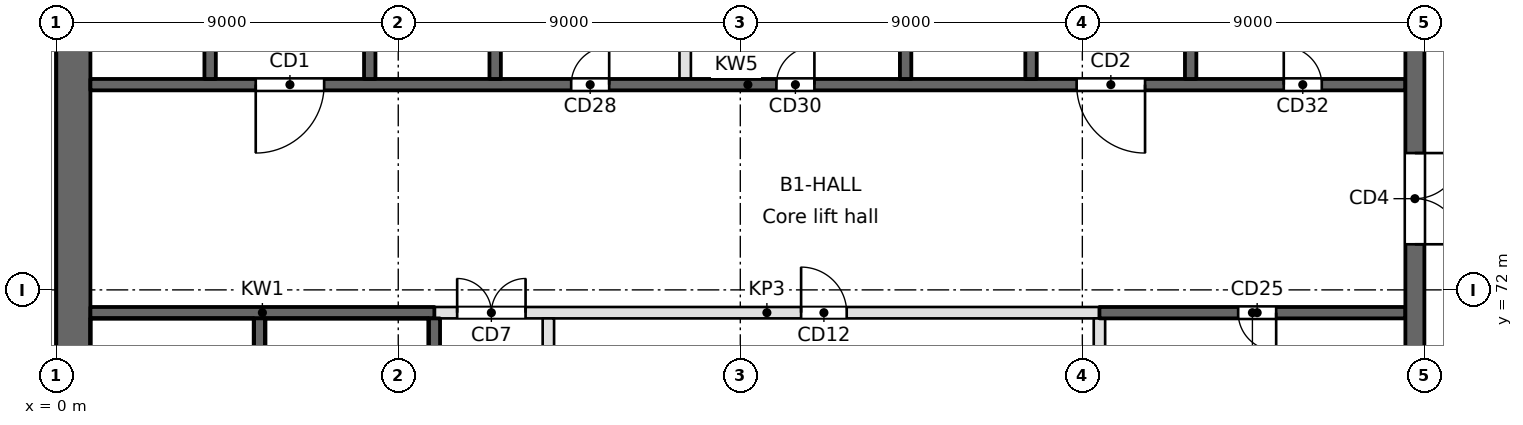
"""IFC4 building model, lengths in metres.
Left out: names, types, materials, properties, quantities, classifications, styles, units other than length and angle.
Written with IfcOpenShell. Run it as: python <this file> out.ifc"""

import sys

from ifc_helpers import new_model, si_unit, direction, frame, frame_2d, origin, place, context, subcontext, project, spatial, rectangle, extrude, element, fill, save


model = new_model("IFC4")
c1 = context("Model", 3, precision=1e-05, world=origin(), true_north=direction((0.0, 1.0)))
c2 = subcontext(c1, "Body", "Model", "MODEL_VIEW")
j1 = project(units=[si_unit("LENGTHUNIT", "METRE"), si_unit("PLANEANGLEUNIT", "RADIAN")], contexts=[c1])
p1 = place(None, origin())
s1 = spatial("IfcSite", under=j1, at=p1, CompositionType="ELEMENT")
p2 = place(p1, origin())
s2 = spatial("IfcBuilding", under=s1, at=p2, CompositionType="ELEMENT")
p3 = place(p2, frame((0.0, 0.0, -6.0)))
s3 = spatial("IfcBuildingStorey", under=s2, at=p3, CompositionType="ELEMENT", Elevation=-6.0)
p4 = place(p3, frame((0.45, 94.5, 0.0), z_axis=(0.0, 0.0, 1.0), x_axis=(0.0, -1.0, 0.0)))
e1 = element("IfcWall", 1, at=p4, inside=s3, PredefinedType="SHEAR", context=c2, shape_type="SweptSolid", body=[
    extrude(rectangle(XDim=66.085, YDim=0.9, at=frame_2d((33.042, 0.0))), origin(), (0.0, 0.0, 1.0), 6.0),
])
p5 = place(p3, frame((0.9, 71.4, 0.0), z_axis=(0.0, 0.0, 1.0), x_axis=(1.0, 0.0, 0.0)))
e2 = element("IfcWall", 2, at=p5, inside=s3, PredefinedType="SOLIDWALL", context=c2, shape_type="SweptSolid", body=[
    extrude(rectangle(XDim=9.05, YDim=0.3, at=frame_2d((4.525, 0.0))), origin(), (0.0, 0.0, 1.0), 5.6),
])
p6 = place(p3, frame((9.95, 71.4, 0.0), z_axis=(0.0, 0.0, 1.0), x_axis=(1.0, 0.0, 0.0)))
e3 = element("IfcWall", 3, at=p6, inside=s3, PredefinedType="PARTITIONING", context=c2, shape_type="SweptSolid", body=[
    extrude(rectangle(XDim=17.5, YDim=0.3, at=frame_2d((8.75, 0.0))), origin(), (0.0, 0.0, 1.0), 5.6),
])
p7 = place(p6, frame((0.6, 0.0, 0.0)))
e4 = element("IfcOpeningElement", 4, at=p7, cuts=e3, PredefinedType="OPENING", context=c2, shape_type="SweptSolid", body=[
    extrude(rectangle(XDim=1.8, YDim=2.1, at=frame_2d((0.9, 1.05))), frame((0.0, 0.15, 0.0), z_axis=(0.0, -1.0, 0.0), x_axis=(1.0, 0.0, 0.0)), (0.0, 0.0, 1.0), 0.3),
])
p8 = place(p6, frame((9.65, 0.0, 0.0)))
e5 = element("IfcOpeningElement", 5, at=p8, cuts=e3, PredefinedType="OPENING", context=c2, shape_type="SweptSolid", body=[
    extrude(rectangle(XDim=1.2, YDim=2.1, at=frame_2d((0.6, 1.05))), frame((0.0, 0.15, 0.0), z_axis=(0.0, -1.0, 0.0), x_axis=(1.0, 0.0, 0.0)), (0.0, 0.0, 1.0), 0.3),
])
p9 = place(p3, frame((27.45, 71.4, 0.0), z_axis=(0.0, 0.0, 1.0), x_axis=(1.0, 0.0, 0.0)))
e6 = element("IfcWall", 6, at=p9, inside=s3, PredefinedType="SOLIDWALL", context=c2, shape_type="SweptSolid", body=[
    extrude(rectangle(XDim=8.05, YDim=0.3, at=frame_2d((4.025, 0.0))), origin(), (0.0, 0.0, 1.0), 5.6),
])
p10 = place(p9, frame((3.65, 0.0, 0.0)))
e7 = element("IfcOpeningElement", 7, at=p10, cuts=e6, PredefinedType="OPENING", context=c2, shape_type="SweptSolid", body=[
    extrude(rectangle(XDim=1.0, YDim=2.1, at=frame_2d((0.5, 1.05))), frame((0.0, 0.15, 0.0), z_axis=(0.0, -1.0, 0.0), x_axis=(1.0, 0.0, 0.0)), (0.0, 0.0, 1.0), 0.3),
])
p11 = place(p3, frame((0.9, 77.4, 0.0), z_axis=(0.0, 0.0, 1.0), x_axis=(1.0, 0.0, 0.0)))
e8 = element("IfcWall", 8, at=p11, inside=s3, PredefinedType="SOLIDWALL", context=c2, shape_type="SweptSolid", body=[
    extrude(rectangle(XDim=34.6, YDim=0.3, at=frame_2d((17.3, 0.0))), origin(), (0.0, 0.0, 1.0), 5.6),
])
p12 = place(p11, frame((4.35, 0.0, 0.0)))
e9 = element("IfcOpeningElement", 9, at=p12, cuts=e8, PredefinedType="OPENING", context=c2, shape_type="SweptSolid", body=[
    extrude(rectangle(XDim=1.8, YDim=2.1, at=frame_2d((0.9, 1.05))), frame((0.0, 0.15, 0.0), z_axis=(0.0, -1.0, 0.0), x_axis=(1.0, 0.0, 0.0)), (0.0, 0.0, 1.0), 0.3),
])
p13 = place(p11, frame((25.95, 0.0, 0.0)))
e10 = element("IfcOpeningElement", 10, at=p13, cuts=e8, PredefinedType="OPENING", context=c2, shape_type="SweptSolid", body=[
    extrude(rectangle(XDim=1.8, YDim=2.1, at=frame_2d((0.9, 1.05))), frame((0.0, 0.15, 0.0), z_axis=(0.0, -1.0, 0.0), x_axis=(1.0, 0.0, 0.0)), (0.0, 0.0, 1.0), 0.3),
])
p14 = place(p11, frame((12.65, 0.0, 0.0)))
e11 = element("IfcOpeningElement", 11, at=p14, cuts=e8, PredefinedType="OPENING", context=c2, shape_type="SweptSolid", body=[
    extrude(rectangle(XDim=1.0, YDim=2.1, at=frame_2d((0.5, 1.05))), frame((0.0, 0.15, 0.0), z_axis=(0.0, -1.0, 0.0), x_axis=(1.0, 0.0, 0.0)), (0.0, 0.0, 1.0), 0.3),
])
p15 = place(p11, frame((18.05, 0.0, 0.0)))
e12 = element("IfcOpeningElement", 12, at=p15, cuts=e8, PredefinedType="OPENING", context=c2, shape_type="SweptSolid", body=[
    extrude(rectangle(XDim=1.0, YDim=2.1, at=frame_2d((0.5, 1.05))), frame((0.0, 0.15, 0.0), z_axis=(0.0, -1.0, 0.0), x_axis=(1.0, 0.0, 0.0)), (0.0, 0.0, 1.0), 0.3),
])
p16 = place(p11, frame((31.4, 0.0, 0.0)))
e13 = element("IfcOpeningElement", 13, at=p16, cuts=e8, PredefinedType="OPENING", context=c2, shape_type="SweptSolid", body=[
    extrude(rectangle(XDim=1.0, YDim=2.1, at=frame_2d((0.5, 1.05))), frame((0.0, 0.15, 0.0), z_axis=(0.0, -1.0, 0.0), x_axis=(1.0, 0.0, 0.0)), (0.0, 0.0, 1.0), 0.3),
])
p17 = place(p3, frame((4.05, 77.55, 0.0), z_axis=(0.0, 0.0, 1.0), x_axis=(0.0, 1.0, 0.0)))
e14 = element("IfcWall", 14, at=p17, inside=s3, PredefinedType="SOLIDWALL", context=c2, shape_type="SweptSolid", body=[
    extrude(rectangle(XDim=10.1, YDim=0.3, at=frame_2d((5.05, 0.0))), origin(), (0.0, 0.0, 1.0), 5.6),
])
p18 = place(p3, frame((5.35, 63.5, 0.0), z_axis=(0.0, 0.0, 1.0), x_axis=(0.0, 1.0, 0.0)))
e15 = element("IfcWall", 15, at=p18, inside=s3, PredefinedType="SOLIDWALL", context=c2, shape_type="SweptSolid", body=[
    extrude(rectangle(XDim=7.75, YDim=0.3, at=frame_2d((3.875, 0.0))), origin(), (0.0, 0.0, 1.0), 5.6),
])
p19 = place(p3, frame((8.25, 77.55, 0.0), z_axis=(0.0, 0.0, 1.0), x_axis=(0.0, 1.0, 0.0)))
e16 = element("IfcWall", 16, at=p19, inside=s3, PredefinedType="SOLIDWALL", context=c2, shape_type="SweptSolid", body=[
    extrude(rectangle(XDim=10.1, YDim=0.3, at=frame_2d((5.05, 0.0))), origin(), (0.0, 0.0, 1.0), 5.6),
])
p20 = place(p3, frame((9.95, 63.5, 0.0), z_axis=(0.0, 0.0, 1.0), x_axis=(0.0, 1.0, 0.0)))
e17 = element("IfcWall", 17, at=p20, inside=s3, PredefinedType="SOLIDWALL", context=c2, shape_type="SweptSolid", body=[
    extrude(rectangle(XDim=7.75, YDim=0.3, at=frame_2d((3.875, 0.0))), origin(), (0.0, 0.0, 1.0), 5.6),
])
p21 = place(p3, frame((11.55, 77.55, 0.0), z_axis=(0.0, 0.0, 1.0), x_axis=(0.0, 1.0, 0.0)))
e18 = element("IfcWall", 18, at=p21, inside=s3, PredefinedType="SOLIDWALL", context=c2, shape_type="SweptSolid", body=[
    extrude(rectangle(XDim=10.1, YDim=0.3, at=frame_2d((5.05, 0.0))), origin(), (0.0, 0.0, 1.0), 5.6),
])
p22 = place(p3, frame((12.95, 63.5, 0.0), z_axis=(0.0, 0.0, 1.0), x_axis=(0.0, 1.0, 0.0)))
e19 = element("IfcWall", 19, at=p22, inside=s3, PredefinedType="PARTITIONING", context=c2, shape_type="SweptSolid", body=[
    extrude(rectangle(XDim=7.75, YDim=0.3, at=frame_2d((3.875, 0.0))), origin(), (0.0, 0.0, 1.0), 5.6),
])
p23 = place(p3, frame((16.55, 77.55, 0.0), z_axis=(0.0, 0.0, 1.0), x_axis=(0.0, 1.0, 0.0)))
e20 = element("IfcWall", 20, at=p23, inside=s3, PredefinedType="PARTITIONING", context=c2, shape_type="SweptSolid", body=[
    extrude(rectangle(XDim=12.95, YDim=0.3, at=frame_2d((6.475, 0.0))), origin(), (0.0, 0.0, 1.0), 5.6),
])
for number, where, z_axis, x_axis in (
    (21, (22.35, 77.55, 0.0), (0.0, 0.0, 1.0), (0.0, 1.0, 0.0)),
    (22, (25.65, 77.55, 0.0), (0.0, 0.0, 1.0), (0.0, 1.0, 0.0)),
):
    element("IfcWall", number, at=place(p3, frame(where, z_axis=z_axis, x_axis=x_axis)), inside=s3, PredefinedType="SOLIDWALL", context=c2, shape_type="SweptSolid", body=[
        extrude(rectangle(XDim=10.1, YDim=0.3, at=frame_2d((5.05, 0.0))), origin(), (0.0, 0.0, 1.0), 5.6),
    ])
p24 = place(p3, frame((27.45, 68.05, 0.0), z_axis=(0.0, 0.0, 1.0), x_axis=(0.0, 1.0, 0.0)))
e23 = element("IfcWall", 23, at=p24, inside=s3, PredefinedType="PARTITIONING", context=c2, shape_type="SweptSolid", body=[
    extrude(rectangle(XDim=3.2, YDim=0.3, at=frame_2d((1.6, 0.0))), origin(), (0.0, 0.0, 1.0), 5.6),
])
p25 = place(p3, frame((29.85, 77.55, 0.0), z_axis=(0.0, 0.0, 1.0), x_axis=(0.0, 1.0, 0.0)))
e24 = element("IfcWall", 24, at=p25, inside=s3, PredefinedType="SOLIDWALL", context=c2, shape_type="SweptSolid", body=[
    extrude(rectangle(XDim=10.1, YDim=0.3, at=frame_2d((5.05, 0.0))), origin(), (0.0, 0.0, 1.0), 5.6),
])
p26 = place(p3, frame((35.75, 63.5, 0.0), z_axis=(0.0, 0.0, 1.0), x_axis=(0.0, 1.0, 0.0)))
e25 = element("IfcWall", 25, at=p26, inside=s3, PredefinedType="SOLIDWALL", context=c2, shape_type="SweptSolid", body=[
    extrude(rectangle(XDim=34.6, YDim=0.5, at=frame_2d((17.3, 0.0))), origin(), (0.0, 0.0, 1.0), 5.6),
])
p27 = place(p26, frame((9.7, 0.0, 0.0)))
e26 = element("IfcOpeningElement", 26, at=p27, cuts=e25, PredefinedType="OPENING", context=c2, shape_type="SweptSolid", body=[
    extrude(rectangle(XDim=2.4, YDim=2.1, at=frame_2d((1.2, 1.05))), frame((0.0, 0.25, 0.0), z_axis=(0.0, -1.0, 0.0), x_axis=(1.0, 0.0, 0.0)), (0.0, 0.0, 1.0), 0.5),
])
p28 = place(p26, frame((27.9, 0.0, 0.0)))
e27 = element("IfcOpeningElement", 27, at=p28, cuts=e25, PredefinedType="OPENING", context=c2, shape_type="SweptSolid", body=[
    extrude(rectangle(XDim=1.5, YDim=2.1, at=frame_2d((0.75, 1.05))), frame((0.0, 0.25, 0.0), z_axis=(0.0, -1.0, 0.0), x_axis=(1.0, 0.0, 0.0)), (0.0, 0.0, 1.0), 0.5),
])
p29 = place(p26, frame((1.5, 0.0, 0.0)))
e28 = element("IfcOpeningElement", 28, at=p29, cuts=e25, PredefinedType="OPENING", context=c2, shape_type="SweptSolid", body=[
    extrude(rectangle(XDim=1.2, YDim=2.1, at=frame_2d((0.6, 1.05))), frame((0.0, 0.25, 0.0), z_axis=(0.0, -1.0, 0.0), x_axis=(1.0, 0.0, 0.0)), (0.0, 0.0, 1.0), 0.5),
])
p30 = place(p12, frame((1.8, 0.0, 0.0), z_axis=(0.0, 0.0, 1.0), x_axis=(-1.0, 0.0, 0.0)))
e29 = element("IfcDoor", 29, at=p30, inside=s3, OperationType="SINGLE_SWING_RIGHT", PredefinedType="DOOR", context=c2, shape_type="SweptSolid", body=[
    extrude(rectangle(XDim=1.8, YDim=2.1, at=frame_2d((0.9, 1.05))), frame((0.0, 0.025, 0.0), z_axis=(0.0, -1.0, 0.0), x_axis=(1.0, 0.0, 0.0)), (0.0, 0.0, 1.0), 0.05),
])
fill(e9, e29)
p31 = place(p13, frame((1.8, 0.0, 0.0), z_axis=(0.0, 0.0, 1.0), x_axis=(-1.0, 0.0, 0.0)))
e30 = element("IfcDoor", 30, at=p31, inside=s3, OperationType="SINGLE_SWING_LEFT", PredefinedType="DOOR", context=c2, shape_type="SweptSolid", body=[
    extrude(rectangle(XDim=1.8, YDim=2.1, at=frame_2d((0.9, 1.05))), frame((0.0, 0.025, 0.0), z_axis=(0.0, -1.0, 0.0), x_axis=(1.0, 0.0, 0.0)), (0.0, 0.0, 1.0), 0.05),
])
fill(e10, e30)
p32 = place(p27, frame((2.4, 0.0, 0.0), z_axis=(0.0, 0.0, 1.0), x_axis=(-1.0, 0.0, 0.0)))
e31 = element("IfcDoor", 31, at=p32, inside=s3, OperationType="DOUBLE_DOOR_SINGLE_SWING", PredefinedType="DOOR", context=c2, shape_type="SweptSolid", body=[
    extrude(rectangle(XDim=2.4, YDim=2.1, at=frame_2d((1.2, 1.05))), frame((0.0, 0.025, 0.0), z_axis=(0.0, -1.0, 0.0), x_axis=(1.0, 0.0, 0.0)), (0.0, 0.0, 1.0), 0.05),
])
fill(e26, e31)
p33 = place(p7, origin())
e32 = element("IfcDoor", 32, at=p33, inside=s3, OperationType="DOUBLE_DOOR_SINGLE_SWING", PredefinedType="DOOR", context=c2, shape_type="SweptSolid", body=[
    extrude(rectangle(XDim=1.8, YDim=2.1, at=frame_2d((0.9, 1.05))), frame((0.0, 0.025, 0.0), z_axis=(0.0, -1.0, 0.0), x_axis=(1.0, 0.0, 0.0)), (0.0, 0.0, 1.0), 0.05),
])
fill(e4, e32)
p34 = place(p8, origin())
e33 = element("IfcDoor", 33, at=p34, inside=s3, OperationType="SINGLE_SWING_LEFT", PredefinedType="DOOR", context=c2, shape_type="SweptSolid", body=[
    extrude(rectangle(XDim=1.2, YDim=2.1, at=frame_2d((0.6, 1.05))), frame((0.0, 0.025, 0.0), z_axis=(0.0, -1.0, 0.0), x_axis=(1.0, 0.0, 0.0)), (0.0, 0.0, 1.0), 0.05),
])
fill(e5, e33)
p35 = place(p10, frame((1.0, 0.0, 0.0), z_axis=(0.0, 0.0, 1.0), x_axis=(-1.0, 0.0, 0.0)))
e34 = element("IfcDoor", 34, at=p35, inside=s3, OperationType="SINGLE_SWING_LEFT", PredefinedType="DOOR", context=c2, shape_type="SweptSolid", body=[
    extrude(rectangle(XDim=1.0, YDim=2.1, at=frame_2d((0.5, 1.05))), frame((0.0, 0.025, 0.0), z_axis=(0.0, -1.0, 0.0), x_axis=(1.0, 0.0, 0.0)), (0.0, 0.0, 1.0), 0.05),
])
fill(e7, e34)
p36 = place(p14, origin())
e35 = element("IfcDoor", 35, at=p36, inside=s3, OperationType="SINGLE_SWING_RIGHT", PredefinedType="DOOR", context=c2, shape_type="SweptSolid", body=[
    extrude(rectangle(XDim=1.0, YDim=2.1, at=frame_2d((0.5, 1.05))), frame((0.0, 0.025, 0.0), z_axis=(0.0, -1.0, 0.0), x_axis=(1.0, 0.0, 0.0)), (0.0, 0.0, 1.0), 0.05),
])
fill(e11, e35)
p37 = place(p15, origin())
e36 = element("IfcDoor", 36, at=p37, inside=s3, OperationType="SINGLE_SWING_RIGHT", PredefinedType="DOOR", context=c2, shape_type="SweptSolid", body=[
    extrude(rectangle(XDim=1.0, YDim=2.1, at=frame_2d((0.5, 1.05))), frame((0.0, 0.025, 0.0), z_axis=(0.0, -1.0, 0.0), x_axis=(1.0, 0.0, 0.0)), (0.0, 0.0, 1.0), 0.05),
])
fill(e12, e36)
p38 = place(p16, origin())
e37 = element("IfcDoor", 37, at=p38, inside=s3, OperationType="SINGLE_SWING_LEFT", PredefinedType="DOOR", context=c2, shape_type="SweptSolid", body=[
    extrude(rectangle(XDim=1.0, YDim=2.1, at=frame_2d((0.5, 1.05))), frame((0.0, 0.025, 0.0), z_axis=(0.0, -1.0, 0.0), x_axis=(1.0, 0.0, 0.0)), (0.0, 0.0, 1.0), 0.05),
])
fill(e13, e37)
save(model, sys.argv[1])
